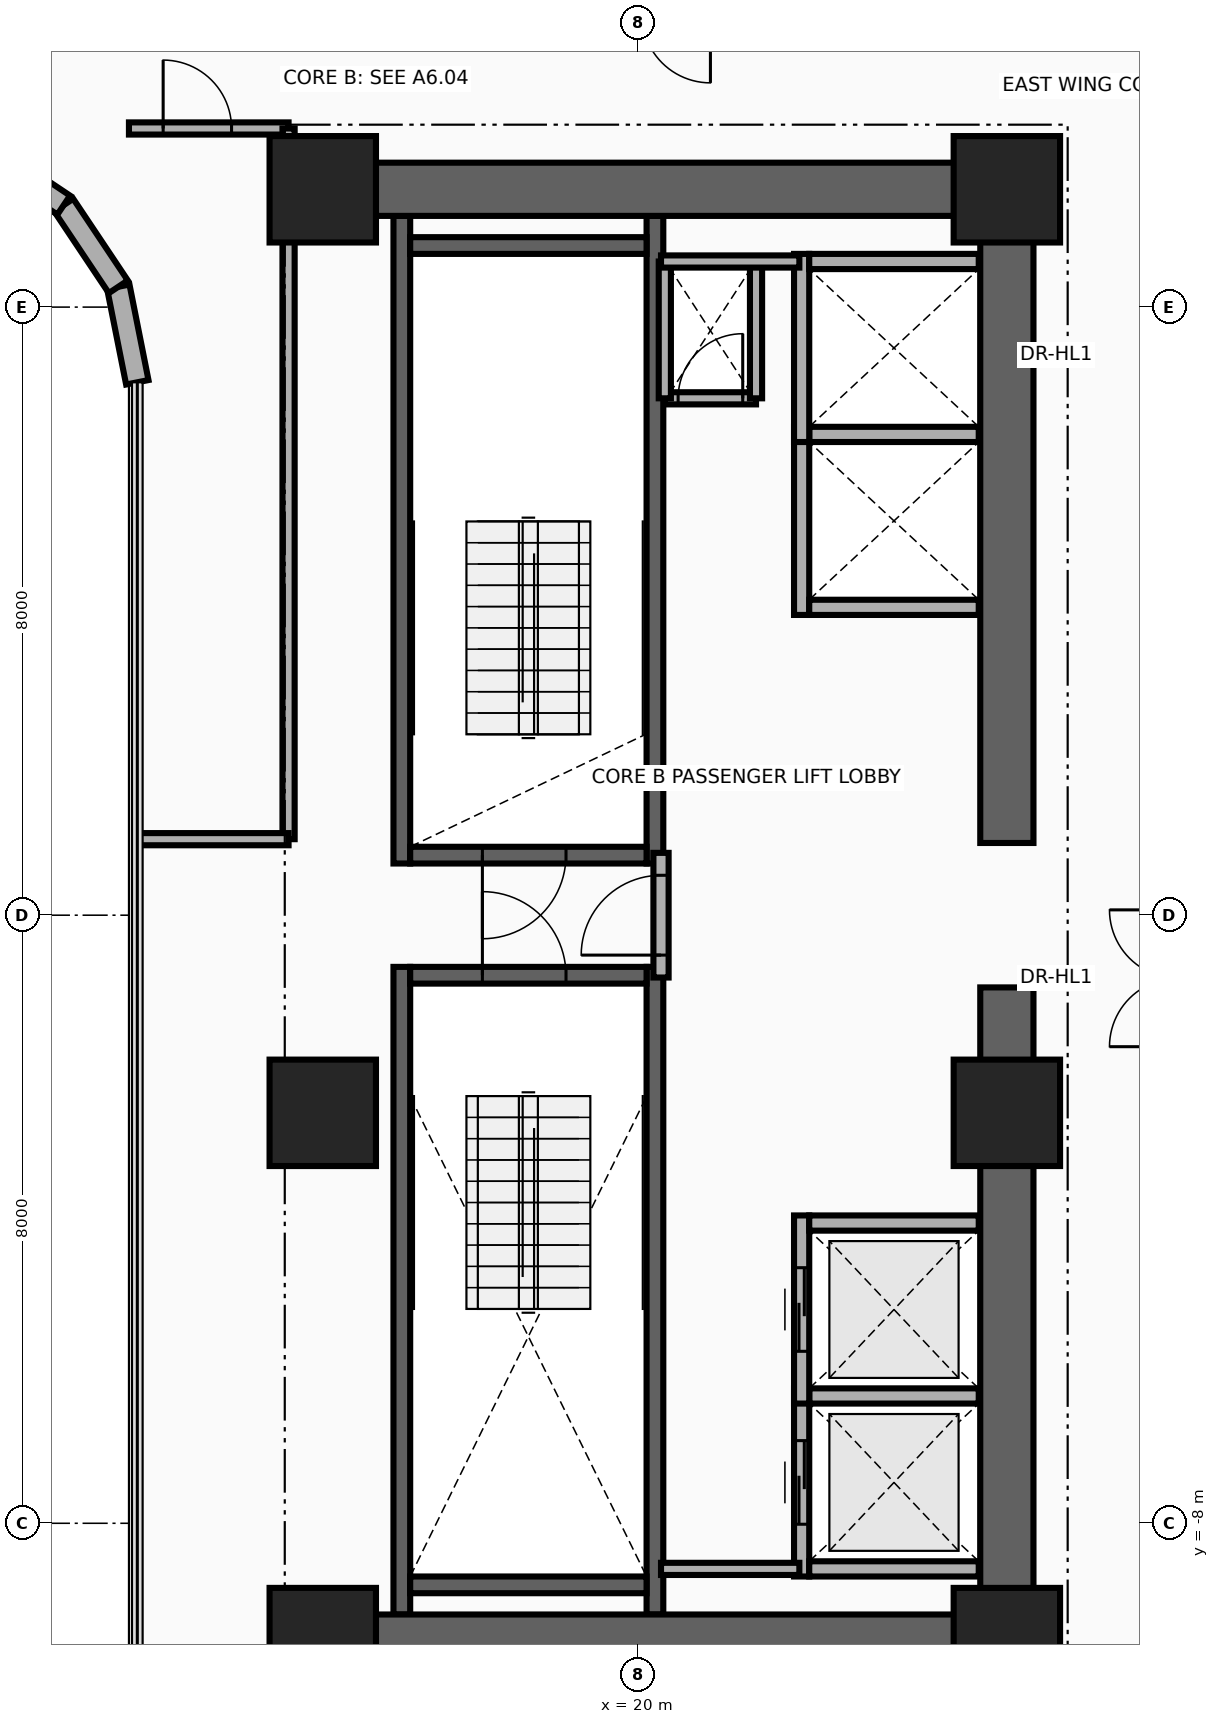
"""IFC4 building model, lengths in metres.
Left out: names, types, materials, properties, quantities, classifications, styles, units other than length and angle.
Written with IfcOpenShell. Run it as: python <this file> out.ifc"""

import sys

from ifc_helpers import new_model, si_unit, direction, frame, frame_2d, origin, origin_2d, place, context, subcontext, project, spatial, rectangle, extrude, source, transform, mapped, element, fill, save


model = new_model("IFC4")
c1 = context("Model", 3, precision=1e-05, world=origin(), true_north=direction((0.0, 1.0)))
c2 = subcontext(c1, "Body", "Model", "MODEL_VIEW")
j1 = project(units=[si_unit("LENGTHUNIT", "METRE"), si_unit("PLANEANGLEUNIT", "RADIAN")], contexts=[c1])
p1 = place(None, origin())
s1 = spatial("IfcSite", under=j1, at=p1, CompositionType="ELEMENT")
p2 = place(p1, origin())
s2 = spatial("IfcBuilding", under=s1, at=p2, CompositionType="ELEMENT")
p3 = place(p2, frame((0.0, 0.0, 59.3)))
s3 = spatial("IfcBuildingStorey", under=s2, at=p3, CompositionType="ELEMENT", Elevation=59.3)
for number, where, z_axis, x_axis in (
    (1, (16.89, 0.68, 0.0), (0.0, 0.0, 1.0), (0.0, 1.0, 0.0)),
    (2, (20.22, 0.68, 0.0), (0.0, 0.0, 1.0), (0.0, 1.0, 0.0)),
):
    element("IfcWall", number, at=place(p3, frame(where, z_axis=z_axis, x_axis=x_axis)), inside=s3, PredefinedType="SHEAR", context=c2, shape_type="SweptSolid", body=[
        extrude(rectangle(XDim=8.52, YDim=0.22, at=frame_2d((4.26, 0.0))), origin(), (0.0, 0.0, 1.0), 3.46),
    ])
p4 = place(p3, frame((17.0, 0.79, 0.0), z_axis=(0.0, 0.0, 1.0), x_axis=(1.0, 0.0, 0.0)))
e3 = element("IfcWall", 3, at=p4, inside=s3, PredefinedType="SHEAR", context=c2, shape_type="SweptSolid", body=[
    extrude(rectangle(XDim=3.11, YDim=0.22, at=frame_2d((1.555, 0.0))), origin(), (0.0, 0.0, 1.0), 3.46),
])
p5 = place(p4, frame((0.95, 0.0, 0.0)))
e4 = element("IfcOpeningElement", 4, at=p5, cuts=e3, PredefinedType="OPENING", context=c2, shape_type="SweptSolid", body=[
    extrude(rectangle(XDim=1.1, YDim=2.15, at=frame_2d((0.55, 1.075))), frame((0.0, 0.125, 0.0), z_axis=(0.0, -1.0, 0.0), x_axis=(1.0, 0.0, 0.0)), (0.0, 0.0, 1.0), 0.25),
])
p6 = place(p3, frame((17.0, 8.81, 0.0), z_axis=(0.0, 0.0, 1.0), x_axis=(1.0, 0.0, 0.0)))
e5 = element("IfcWall", 5, at=p6, inside=s3, PredefinedType="SHEAR", context=c2, shape_type="SweptSolid", body=[
    extrude(rectangle(XDim=3.11, YDim=0.22, at=frame_2d((1.555, 0.0))), origin(), (0.0, 0.0, 1.0), 3.46),
])
for number, where, z_axis, x_axis in (
    (6, (16.89, -9.2, 0.0), (0.0, 0.0, 1.0), (0.0, 1.0, 0.0)),
    (7, (20.22, -9.2, 0.0), (0.0, 0.0, 1.0), (0.0, 1.0, 0.0)),
):
    element("IfcWall", number, at=place(p3, frame(where, z_axis=z_axis, x_axis=x_axis)), inside=s3, PredefinedType="SHEAR", context=c2, shape_type="SweptSolid", body=[
        extrude(rectangle(XDim=8.52, YDim=0.22, at=frame_2d((4.26, 0.0))), origin(), (0.0, 0.0, 1.0), 3.46),
    ])
p7 = place(p3, frame((17.0, -8.81, 0.0), z_axis=(0.0, 0.0, 1.0), x_axis=(1.0, 0.0, 0.0)))
e8 = element("IfcWall", 8, at=p7, inside=s3, PredefinedType="SHEAR", context=c2, shape_type="SweptSolid", body=[
    extrude(rectangle(XDim=3.11, YDim=0.22, at=frame_2d((1.555, 0.0))), origin(), (0.0, 0.0, 1.0), 3.46),
])
p8 = place(p3, frame((17.0, -0.79, 0.0), z_axis=(0.0, 0.0, 1.0), x_axis=(1.0, 0.0, 0.0)))
e9 = element("IfcWall", 9, at=p8, inside=s3, PredefinedType="SHEAR", context=c2, shape_type="SweptSolid", body=[
    extrude(rectangle(XDim=3.11, YDim=0.22, at=frame_2d((1.555, 0.0))), origin(), (0.0, 0.0, 1.0), 3.46),
])
p9 = place(p8, frame((0.95, 0.0, 0.0)))
e10 = element("IfcOpeningElement", 10, at=p9, cuts=e9, PredefinedType="OPENING", context=c2, shape_type="SweptSolid", body=[
    extrude(rectangle(XDim=1.1, YDim=2.15, at=frame_2d((0.55, 1.075))), frame((0.0, 0.125, 0.0), z_axis=(0.0, -1.0, 0.0), x_axis=(1.0, 0.0, 0.0)), (0.0, 0.0, 1.0), 0.25),
])
for number, where, z_axis, x_axis in (
    (11, (24.85, -9.9, 0.0), (0.0, 0.0, 1.0), (0.0, 1.0, 0.0)),
    (12, (24.85, 0.95, 0.0), (0.0, 0.0, 1.0), (0.0, 1.0, 0.0)),
):
    element("IfcWall", number, at=place(p3, frame(where, z_axis=z_axis, x_axis=x_axis)), inside=s3, PredefinedType="SHEAR", context=c2, shape_type="SweptSolid", body=[
        extrude(rectangle(XDim=8.95, YDim=0.7, at=frame_2d((4.475, 0.0))), origin(), (0.0, 0.0, 1.0), 3.46),
    ])
for number, where, z_axis, x_axis in (
    (13, (15.85, 9.55, 0.0), (0.0, 0.0, 1.0), (1.0, 0.0, 0.0)),
    (14, (15.85, -9.55, 0.0), (0.0, 0.0, 1.0), (1.0, 0.0, 0.0)),
):
    element("IfcWall", number, at=place(p3, frame(where, z_axis=z_axis, x_axis=x_axis)), inside=s3, PredefinedType="SHEAR", context=c2, shape_type="SweptSolid", body=[
        extrude(rectangle(XDim=9.0, YDim=0.7, at=frame_2d((4.5, 0.0))), origin(), (0.0, 0.0, 1.0), 3.46),
    ])
m1 = source(origin(), c2, "Body", "SweptSolid", [
    extrude(rectangle(XDim=1.4, YDim=1.4, at=origin_2d()), origin(), (0.0, 0.0, 1.0), 3.7),
])
for number, where, z_axis, x_axis in (
    (15, (15.85, -9.55, 0.0), (0.0, 0.0, 1.0), (1.0, 0.0, 0.0)),
    (16, (24.85, -9.55, 0.0), (0.0, 0.0, 1.0), (1.0, 0.0, 0.0)),
    (17, (15.85, -2.6, 0.0), (0.0, 0.0, 1.0), (1.0, 0.0, 0.0)),
    (18, (24.85, -2.6, 0.0), (0.0, 0.0, 1.0), (1.0, 0.0, 0.0)),
    (19, (15.85, 9.55, 0.0), (0.0, 0.0, 1.0), (1.0, 0.0, 0.0)),
    (20, (24.85, 9.55, 0.0), (0.0, 0.0, 1.0), (1.0, 0.0, 0.0)),
):
    element("IfcColumn", number, at=place(p3, frame(where, z_axis=z_axis, x_axis=x_axis)), inside=s3, PredefinedType="COLUMN", context=c2, shape_type="MappedRepresentation", body=[
        mapped(m1, transform((0.0, 0.0, 0.0), x_axis=(1.0, 0.0, 0.0), y_axis=(0.0, 1.0, 0.0), z_axis=(0.0, 0.0, 1.0), scale=1.0)),
    ])
p10 = place(p3, frame((13.41, 7.011, 0.0), z_axis=(0.0, 0.0, 1.0), x_axis=(-0.195090163074, 0.980785312019, 0.0)))
e21 = element("IfcWall", 21, at=p10, inside=s3, PredefinedType="SOLIDWALL", context=c2, shape_type="SweptSolid", body=[
    extrude(rectangle(XDim=1.281, YDim=0.3, at=frame_2d((0.641, 0.0))), origin(), (0.0, 0.0, 1.0), 3.46),
])
for number, where, z_axis, x_axis in (
    (22, (13.16, 8.268, 0.0), (0.0, 0.0, 1.0), (-0.556, 0.831, 0.0)),
    (23, (12.442, 9.342, 0.0), (0.0, 0.0, 1.0), (-0.831, 0.556, 0.0)),
):
    element("IfcWall", number, at=place(p3, frame(where, z_axis=z_axis, x_axis=x_axis)), inside=s3, PredefinedType="SOLIDWALL", context=c2, shape_type="SweptSolid", body=[
        extrude(rectangle(XDim=1.292, YDim=0.3, at=frame_2d((0.646, 0.0))), origin(), (0.0, 0.0, 1.0), 3.46),
    ])
p11 = place(p3, frame((22.15, -8.7, 0.0), z_axis=(0.0, 0.0, 1.0), x_axis=(0.0, 1.0, 0.0)))
e24 = element("IfcWall", 24, at=p11, inside=s3, PredefinedType="MOVABLE", context=c2, shape_type="SweptSolid", body=[
    extrude(rectangle(XDim=2.475, YDim=0.2, at=frame_2d((1.237, 0.0))), origin(), (0.0, 0.0, 1.0), 3.46),
])
p12 = place(p11, frame((0.688, 0.0, 0.0)))
e25 = element("IfcOpeningElement", 25, at=p12, cuts=e24, PredefinedType="OPENING", context=c2, shape_type="SweptSolid", body=[
    extrude(rectangle(XDim=1.1, YDim=2.1, at=frame_2d((0.55, 1.05))), frame((0.0, 0.115, 0.0), z_axis=(0.0, -1.0, 0.0), x_axis=(1.0, 0.0, 0.0)), (0.0, 0.0, 1.0), 0.23),
])
for number, where, z_axis, x_axis in (
    (26, (22.25, -8.6, 0.0), (0.0, 0.0, 1.0), (1.0, 0.0, 0.0)),
    (27, (22.25, -6.325, 0.0), (0.0, 0.0, 1.0), (1.0, 0.0, 0.0)),
):
    element("IfcWall", number, at=place(p3, frame(where, z_axis=z_axis, x_axis=x_axis)), inside=s3, PredefinedType="MOVABLE", context=c2, shape_type="SweptSolid", body=[
        extrude(rectangle(XDim=2.23, YDim=0.2, at=frame_2d((1.115, 0.0))), origin(), (0.0, 0.0, 1.0), 3.46),
    ])
p13 = place(p3, frame((22.15, -6.425, 0.0), z_axis=(0.0, 0.0, 1.0), x_axis=(0.0, 1.0, 0.0)))
e28 = element("IfcWall", 28, at=p13, inside=s3, PredefinedType="MOVABLE", context=c2, shape_type="SweptSolid", body=[
    extrude(rectangle(XDim=2.475, YDim=0.2, at=frame_2d((1.238, 0.0))), origin(), (0.0, 0.0, 1.0), 3.46),
])
p14 = place(p13, frame((0.688, 0.0, 0.0)))
e29 = element("IfcOpeningElement", 29, at=p14, cuts=e28, PredefinedType="OPENING", context=c2, shape_type="SweptSolid", body=[
    extrude(rectangle(XDim=1.1, YDim=2.1, at=frame_2d((0.55, 1.05))), frame((0.0, 0.115, 0.0), z_axis=(0.0, -1.0, 0.0), x_axis=(1.0, 0.0, 0.0)), (0.0, 0.0, 1.0), 0.23),
])
p15 = place(p3, frame((22.25, -4.05, 0.0), z_axis=(0.0, 0.0, 1.0), x_axis=(1.0, 0.0, 0.0)))
e30 = element("IfcWall", 30, at=p15, inside=s3, PredefinedType="MOVABLE", context=c2, shape_type="SweptSolid", body=[
    extrude(rectangle(XDim=2.23, YDim=0.2, at=frame_2d((1.115, 0.0))), origin(), (0.0, 0.0, 1.0), 3.46),
])
p16 = place(p3, frame((22.15, 3.95, 0.0), z_axis=(0.0, 0.0, 1.0), x_axis=(0.0, 1.0, 0.0)))
e31 = element("IfcWall", 31, at=p16, inside=s3, PredefinedType="MOVABLE", context=c2, shape_type="SweptSolid", body=[
    extrude(rectangle(XDim=2.475, YDim=0.2, at=frame_2d((1.238, 0.0))), origin(), (0.0, 0.0, 1.0), 3.46),
])
for number, where, z_axis, x_axis in (
    (32, (22.25, 4.05, 0.0), (0.0, 0.0, 1.0), (1.0, 0.0, 0.0)),
    (33, (22.25, 6.325, 0.0), (0.0, 0.0, 1.0), (1.0, 0.0, 0.0)),
):
    element("IfcWall", number, at=place(p3, frame(where, z_axis=z_axis, x_axis=x_axis)), inside=s3, PredefinedType="MOVABLE", context=c2, shape_type="SweptSolid", body=[
        extrude(rectangle(XDim=2.23, YDim=0.2, at=frame_2d((1.115, 0.0))), origin(), (0.0, 0.0, 1.0), 2.245),
    ])
p17 = place(p3, frame((22.15, 6.225, 0.0), z_axis=(0.0, 0.0, 1.0), x_axis=(0.0, 1.0, 0.0)))
e34 = element("IfcWall", 34, at=p17, inside=s3, PredefinedType="MOVABLE", context=c2, shape_type="SweptSolid", body=[
    extrude(rectangle(XDim=2.475, YDim=0.2, at=frame_2d((1.237, 0.0))), origin(), (0.0, 0.0, 1.0), 3.46),
])
p18 = place(p3, frame((22.25, 8.6, 0.0), z_axis=(0.0, 0.0, 1.0), x_axis=(1.0, 0.0, 0.0)))
e35 = element("IfcWall", 35, at=p18, inside=s3, PredefinedType="MOVABLE", context=c2, shape_type="SweptSolid", body=[
    extrude(rectangle(XDim=2.23, YDim=0.2, at=frame_2d((1.115, 0.0))), origin(), (0.0, 0.0, 1.0), 2.245),
])
p19 = place(p3, frame((20.3, -0.82, 0.0), z_axis=(0.0, 0.0, 1.0), x_axis=(0.0, 1.0, 0.0)))
e36 = element("IfcWall", 36, at=p19, inside=s3, PredefinedType="PARTITIONING", context=c2, shape_type="SweptSolid", body=[
    extrude(rectangle(XDim=1.64, YDim=0.2, at=frame_2d((0.82, 0.0))), origin(), (0.0, 0.0, 1.0), 3.46),
])
p20 = place(p19, frame((0.295, 0.0, 0.0)))
e37 = element("IfcOpeningElement", 37, at=p20, cuts=e36, PredefinedType="OPENING", context=c2, shape_type="SweptSolid", body=[
    extrude(rectangle(XDim=1.05, YDim=2.15, at=frame_2d((0.525, 1.075))), frame((0.0, 0.115, 0.0), z_axis=(0.0, -1.0, 0.0), x_axis=(1.0, 0.0, 0.0)), (0.0, 0.0, 1.0), 0.23),
])
p21 = place(p3, frame((20.35, 6.8, 0.0), z_axis=(0.0, 0.0, 1.0), x_axis=(1.0, 0.0, 0.0)))
e38 = element("IfcWall", 38, at=p21, inside=s3, PredefinedType="PARTITIONING", context=c2, shape_type="SweptSolid", body=[
    extrude(rectangle(XDim=1.2, YDim=0.16, at=frame_2d((0.6, 0.0))), origin(), (0.0, 0.0, 1.0), 3.46),
])
p22 = place(p21, frame((0.175, 0.0, 0.0)))
e39 = element("IfcOpeningElement", 39, at=p22, cuts=e38, PredefinedType="OPENING", context=c2, shape_type="SweptSolid", body=[
    extrude(rectangle(XDim=0.85, YDim=2.05, at=frame_2d((0.425, 1.025))), frame((0.0, 0.095, 0.0), z_axis=(0.0, -1.0, 0.0), x_axis=(1.0, 0.0, 0.0)), (0.0, 0.0, 1.0), 0.19),
])
for number, where, z_axis, x_axis in (
    (40, (21.55, 6.8, 0.0), (0.0, 0.0, 1.0), (0.0, 1.0, 0.0)),
    (41, (20.35, 6.8, 0.0), (0.0, 0.0, 1.0), (0.0, 1.0, 0.0)),
):
    element("IfcWall", number, at=place(p3, frame(where, z_axis=z_axis, x_axis=x_axis)), inside=s3, PredefinedType="PARTITIONING", context=c2, shape_type="SweptSolid", body=[
        extrude(rectangle(XDim=1.8, YDim=0.16, at=frame_2d((0.9, 0.0))), origin(), (0.0, 0.0, 1.0), 3.46),
    ])
for number, where, z_axis, x_axis in (
    (42, (20.3, -8.6, 0.0), (0.0, 0.0, 1.0), (1.0, 0.0, 0.0)),
    (43, (20.3, 8.6, 0.0), (0.0, 0.0, 1.0), (1.0, 0.0, 0.0)),
):
    element("IfcWall", number, at=place(p3, frame(where, z_axis=z_axis, x_axis=x_axis)), inside=s3, PredefinedType="PARTITIONING", context=c2, shape_type="SweptSolid", body=[
        extrude(rectangle(XDim=1.82, YDim=0.16, at=frame_2d((0.91, 0.0))), origin(), (0.0, 0.0, 1.0), 3.46),
    ])
p23 = place(p3, frame((13.3, 10.35, 0.0), z_axis=(0.0, 0.0, 1.0), x_axis=(1.0, 0.0, 0.0)))
e44 = element("IfcWall", 44, at=p23, inside=s3, PredefinedType="PARTITIONING", context=c2, shape_type="SweptSolid", body=[
    extrude(rectangle(XDim=2.1, YDim=0.16, at=frame_2d((1.05, 0.0))), origin(), (0.0, 0.0, 1.0), 2.583),
])
p24 = place(p23, frame((0.45, 0.0, 0.0)))
e45 = element("IfcOpeningElement", 45, at=p24, cuts=e44, PredefinedType="OPENING", context=c2, shape_type="SweptSolid", body=[
    extrude(rectangle(XDim=0.9, YDim=2.1, at=frame_2d((0.45, 1.05))), frame((0.0, 0.095, 0.0), z_axis=(0.0, -1.0, 0.0), x_axis=(1.0, 0.0, 0.0)), (0.0, 0.0, 1.0), 0.19),
])
p25 = place(p3, frame((15.4, 1.0, 0.0), z_axis=(0.0, 0.0, 1.0), x_axis=(0.0, 1.0, 0.0)))
e46 = element("IfcWall", 46, at=p25, inside=s3, PredefinedType="PARTITIONING", context=c2, shape_type="SweptSolid", body=[
    extrude(rectangle(XDim=9.35, YDim=0.16, at=frame_2d((4.675, 0.0))), origin(), (0.0, 0.0, 1.0), 2.245),
])
p26 = place(p3, frame((13.41, 1.0, 0.0), z_axis=(0.0, 0.0, 1.0), x_axis=(1.0, 0.0, 0.0)))
e47 = element("IfcWall", 47, at=p26, inside=s3, PredefinedType="PARTITIONING", context=c2, shape_type="SweptSolid", body=[
    extrude(rectangle(XDim=1.99, YDim=0.16, at=frame_2d((0.995, 0.0))), origin(), (0.0, 0.0, 1.0), 2.245),
])
p27 = place(p12, origin())
e48 = element("IfcDoor", 48, at=p27, inside=s3, OperationType="DOUBLE_DOOR_SLIDING", PredefinedType="DOOR", context=c2, shape_type="SweptSolid", body=[
    extrude(rectangle(XDim=1.1, YDim=2.1, at=frame_2d((0.55, 1.05))), frame((0.0, 0.025, 0.0), z_axis=(0.0, -1.0, 0.0), x_axis=(1.0, 0.0, 0.0)), (0.0, 0.0, 1.0), 0.05),
])
fill(e25, e48)
p28 = place(p14, origin())
e49 = element("IfcDoor", 49, at=p28, inside=s3, OperationType="DOUBLE_DOOR_SLIDING", PredefinedType="DOOR", context=c2, shape_type="SweptSolid", body=[
    extrude(rectangle(XDim=1.1, YDim=2.1, at=frame_2d((0.55, 1.05))), frame((0.0, 0.025, 0.0), z_axis=(0.0, -1.0, 0.0), x_axis=(1.0, 0.0, 0.0)), (0.0, 0.0, 1.0), 0.05),
])
fill(e29, e49)
p29 = place(p20, origin())
e50 = element("IfcDoor", 50, at=p29, inside=s3, OperationType="SINGLE_SWING_RIGHT", PredefinedType="DOOR", context=c2, shape_type="SweptSolid", body=[
    extrude(rectangle(XDim=1.05, YDim=2.15, at=frame_2d((0.525, 1.075))), frame((0.0, 0.025, 0.0), z_axis=(0.0, -1.0, 0.0), x_axis=(1.0, 0.0, 0.0)), (0.0, 0.0, 1.0), 0.05),
])
fill(e37, e50)
p30 = place(p5, frame((1.1, 0.0, 0.0), z_axis=(0.0, 0.0, 1.0), x_axis=(-1.0, 0.0, 0.0)))
e51 = element("IfcDoor", 51, at=p30, inside=s3, OperationType="SINGLE_SWING_LEFT", PredefinedType="DOOR", context=c2, shape_type="SweptSolid", body=[
    extrude(rectangle(XDim=1.1, YDim=2.15, at=frame_2d((0.55, 1.075))), frame((0.0, 0.025, 0.0), z_axis=(0.0, -1.0, 0.0), x_axis=(1.0, 0.0, 0.0)), (0.0, 0.0, 1.0), 0.05),
])
fill(e4, e51)
p31 = place(p9, origin())
e52 = element("IfcDoor", 52, at=p31, inside=s3, OperationType="SINGLE_SWING_RIGHT", PredefinedType="DOOR", context=c2, shape_type="SweptSolid", body=[
    extrude(rectangle(XDim=1.1, YDim=2.15, at=frame_2d((0.55, 1.075))), frame((0.0, 0.025, 0.0), z_axis=(0.0, -1.0, 0.0), x_axis=(1.0, 0.0, 0.0)), (0.0, 0.0, 1.0), 0.05),
])
fill(e10, e52)
p32 = place(p22, origin())
e53 = element("IfcDoor", 53, at=p32, inside=s3, OperationType="SINGLE_SWING_LEFT", PredefinedType="DOOR", context=c2, shape_type="SweptSolid", body=[
    extrude(rectangle(XDim=0.85, YDim=2.05, at=frame_2d((0.425, 1.025))), frame((0.0, 0.025, 0.0), z_axis=(0.0, -1.0, 0.0), x_axis=(1.0, 0.0, 0.0)), (0.0, 0.0, 1.0), 0.05),
])
fill(e39, e53)
p33 = place(p24, origin())
e54 = element("IfcDoor", 54, at=p33, inside=s3, OperationType="SINGLE_SWING_RIGHT", PredefinedType="DOOR", context=c2, shape_type="SweptSolid", body=[
    extrude(rectangle(XDim=0.9, YDim=2.1, at=frame_2d((0.45, 1.05))), frame((0.0, 0.025, 0.0), z_axis=(0.0, -1.0, 0.0), x_axis=(1.0, 0.0, 0.0)), (0.0, 0.0, 1.0), 0.05),
])
fill(e45, e54)
save(model, sys.argv[1])
